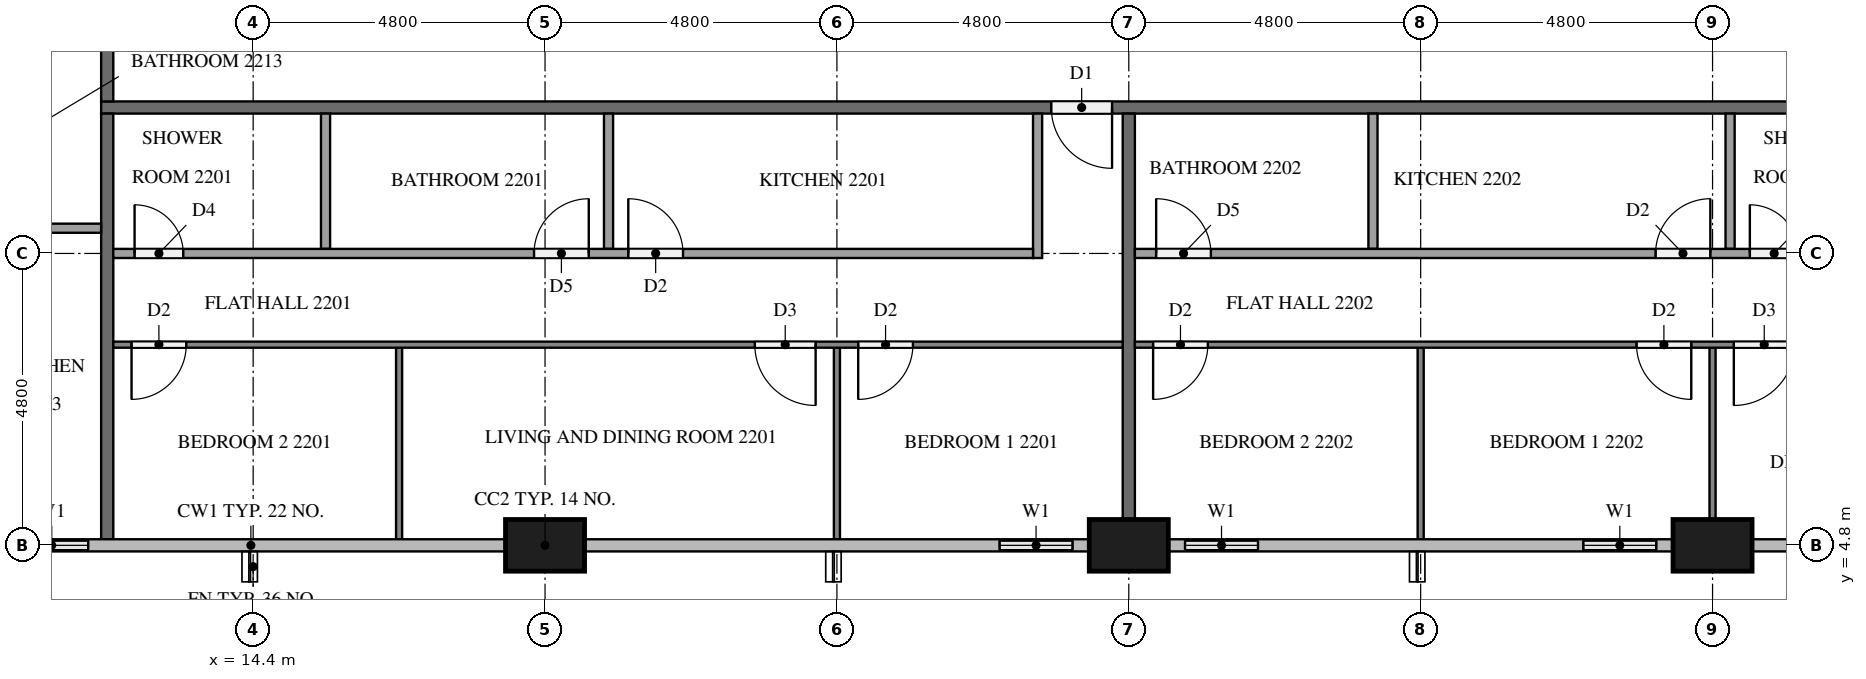
"""IFC4 building model, lengths in metres.
Left out: names, types, materials, properties, quantities, classifications, styles, units other than length and angle.
Written with IfcOpenShell. Run it as: python <this file> out.ifc"""

import sys

from ifc_helpers import new_model, si_unit, direction, frame, frame_2d, origin, origin_2d, place, context, subcontext, project, spatial, rectangle, extrude, element, fill, save


model = new_model("IFC4")
c1 = context("Model", 3, precision=1e-05, world=origin(), true_north=direction((0.0, 1.0)))
c2 = subcontext(c1, "Body", "Model", "MODEL_VIEW")
j1 = project(units=[si_unit("LENGTHUNIT", "METRE"), si_unit("PLANEANGLEUNIT", "RADIAN")], contexts=[c1])
p1 = place(None, origin())
s1 = spatial("IfcSite", under=j1, at=p1, CompositionType="ELEMENT")
p2 = place(p1, origin())
s2 = spatial("IfcBuilding", under=s1, at=p2, CompositionType="ELEMENT")
p3 = place(p2, frame((0.0, 0.0, 89.2)))
s3 = spatial("IfcBuildingStorey", under=s2, at=p3, CompositionType="ELEMENT", Elevation=89.2)
for number, where, z_axis, x_axis in (
    (1, (19.2, 4.8, 0.0), (0.0, 0.0, 1.0), (1.0, 0.0, 0.0)),
    (2, (28.8, 4.8, 0.0), (0.0, 0.0, 1.0), (1.0, 0.0, 0.0)),
    (3, (38.4, 4.8, 0.0), (0.0, 0.0, 1.0), (1.0, 0.0, 0.0)),
):
    element("IfcColumn", number, at=place(p3, frame(where, z_axis=z_axis, x_axis=x_axis)), inside=s3, PredefinedType="COLUMN", context=c2, shape_type="SweptSolid", body=[
        extrude(rectangle(XDim=1.3, YDim=0.85, at=origin_2d()), origin(), (0.0, 0.0, 1.0), 3.2),
    ])
p4 = place(p3, frame((10.175, 4.8, 0.0), z_axis=(0.0, 0.0, 1.0), x_axis=(1.0, 0.0, 0.0)))
e4 = element("IfcWall", 4, at=p4, inside=s3, PredefinedType="SOLIDWALL", context=c2, shape_type="SweptSolid", body=[
    extrude(rectangle(XDim=1.825, YDim=0.15, at=frame_2d((0.913, 0.0))), origin(), (0.0, 0.0, 1.0), 3.2),
])
p5 = place(p4, frame((0.312, 0.0, 0.9)))
e5 = element("IfcOpeningElement", 5, at=p5, cuts=e4, PredefinedType="OPENING", context=c2, shape_type="SweptSolid", body=[
    extrude(rectangle(XDim=1.2, YDim=1.4, at=frame_2d((0.6, 0.7))), frame((0.0, 0.085, 0.0), z_axis=(0.0, -1.0, 0.0), x_axis=(1.0, 0.0, 0.0)), (0.0, 0.0, 1.0), 0.17),
])
p6 = place(p3, frame((26.4, 4.8, 0.0), z_axis=(0.0, 0.0, 1.0), x_axis=(1.0, 0.0, 0.0)))
e6 = element("IfcWall", 6, at=p6, inside=s3, PredefinedType="SOLIDWALL", context=c2, shape_type="SweptSolid", body=[
    extrude(rectangle(XDim=1.75, YDim=0.15, at=frame_2d((0.875, 0.0))), origin(), (0.0, 0.0, 1.0), 3.2),
])
p7 = place(p6, frame((0.275, 0.0, 0.9)))
e7 = element("IfcOpeningElement", 7, at=p7, cuts=e6, PredefinedType="OPENING", context=c2, shape_type="SweptSolid", body=[
    extrude(rectangle(XDim=1.2, YDim=1.4, at=frame_2d((0.6, 0.7))), frame((0.0, 0.085, 0.0), z_axis=(0.0, -1.0, 0.0), x_axis=(1.0, 0.0, 0.0)), (0.0, 0.0, 1.0), 0.17),
])
p8 = place(p3, frame((29.45, 4.8, 0.0), z_axis=(0.0, 0.0, 1.0), x_axis=(1.0, 0.0, 0.0)))
e8 = element("IfcWall", 8, at=p8, inside=s3, PredefinedType="SOLIDWALL", context=c2, shape_type="SweptSolid", body=[
    extrude(rectangle(XDim=1.75, YDim=0.15, at=frame_2d((0.875, 0.0))), origin(), (0.0, 0.0, 1.0), 3.2),
])
p9 = place(p8, frame((0.275, 0.0, 0.9)))
e9 = element("IfcOpeningElement", 9, at=p9, cuts=e8, PredefinedType="OPENING", context=c2, shape_type="SweptSolid", body=[
    extrude(rectangle(XDim=1.2, YDim=1.4, at=frame_2d((0.6, 0.7))), frame((0.0, 0.085, 0.0), z_axis=(0.0, -1.0, 0.0), x_axis=(1.0, 0.0, 0.0)), (0.0, 0.0, 1.0), 0.17),
])
p10 = place(p3, frame((36.0, 4.8, 0.0), z_axis=(0.0, 0.0, 1.0), x_axis=(1.0, 0.0, 0.0)))
e10 = element("IfcWall", 10, at=p10, inside=s3, PredefinedType="SOLIDWALL", context=c2, shape_type="SweptSolid", body=[
    extrude(rectangle(XDim=1.75, YDim=0.15, at=frame_2d((0.875, 0.0))), origin(), (0.0, 0.0, 1.0), 3.2),
])
p11 = place(p10, frame((0.275, 0.0, 0.9)))
e11 = element("IfcOpeningElement", 11, at=p11, cuts=e10, PredefinedType="OPENING", context=c2, shape_type="SweptSolid", body=[
    extrude(rectangle(XDim=1.2, YDim=1.4, at=frame_2d((0.6, 0.7))), frame((0.0, 0.085, 0.0), z_axis=(0.0, -1.0, 0.0), x_axis=(1.0, 0.0, 0.0)), (0.0, 0.0, 1.0), 0.17),
])
p12 = place(p3, frame((50.5, 12.0, 0.0), z_axis=(0.0, 0.0, 1.0), x_axis=(-1.0, 0.0, 0.0)))
e12 = element("IfcWall", 12, at=p12, inside=s3, PredefinedType="PARTITIONING", context=c2, shape_type="SweptSolid", body=[
    extrude(rectangle(XDim=38.6, YDim=0.2, at=frame_2d((19.3, 0.0))), origin(), (0.0, 0.0, 1.0), 3.2),
])
p13 = place(p12, frame((21.975, 0.0, 0.0)))
e13 = element("IfcOpeningElement", 13, at=p13, cuts=e12, PredefinedType="OPENING", context=c2, shape_type="SweptSolid", body=[
    extrude(rectangle(XDim=1.0, YDim=2.1, at=frame_2d((0.5, 1.05))), frame((0.0, 0.11, 0.0), z_axis=(0.0, -1.0, 0.0), x_axis=(1.0, 0.0, 0.0)), (0.0, 0.0, 1.0), 0.22),
])
p14 = place(p12, frame((7.575, 0.0, 0.0)))
e14 = element("IfcOpeningElement", 14, at=p14, cuts=e12, PredefinedType="OPENING", context=c2, shape_type="SweptSolid", body=[
    extrude(rectangle(XDim=1.0, YDim=2.1, at=frame_2d((0.5, 1.05))), frame((0.0, 0.11, 0.0), z_axis=(0.0, -1.0, 0.0), x_axis=(1.0, 0.0, 0.0)), (0.0, 0.0, 1.0), 0.22),
])
p15 = place(p12, frame((0.375, 0.0, 0.0)))
e15 = element("IfcOpeningElement", 15, at=p15, cuts=e12, PredefinedType="OPENING", context=c2, shape_type="SweptSolid", body=[
    extrude(rectangle(XDim=1.0, YDim=2.1, at=frame_2d((0.5, 1.05))), frame((0.0, 0.11, 0.0), z_axis=(0.0, -1.0, 0.0), x_axis=(1.0, 0.0, 0.0)), (0.0, 0.0, 1.0), 0.22),
])
p16 = place(p3, frame((12.0, 12.1, 0.0), z_axis=(0.0, 0.0, 1.0), x_axis=(0.0, 1.0, 0.0)))
e16 = element("IfcWall", 16, at=p16, inside=s3, PredefinedType="PARTITIONING", context=c2, shape_type="SweptSolid", body=[
    extrude(rectangle(XDim=2.8, YDim=0.2, at=frame_2d((1.4, 0.0))), origin(), (0.0, 0.0, 1.0), 3.2),
])
p17 = place(p16, frame((1.625, 0.0, 0.0)))
e17 = element("IfcOpeningElement", 17, at=p17, cuts=e16, PredefinedType="OPENING", context=c2, shape_type="SweptSolid", body=[
    extrude(rectangle(XDim=1.0, YDim=2.1, at=frame_2d((0.5, 1.05))), frame((0.0, 0.11, 0.0), z_axis=(0.0, -1.0, 0.0), x_axis=(1.0, 0.0, 0.0)), (0.0, 0.0, 1.0), 0.22),
])
p18 = place(p3, frame((28.8, 11.9, 0.0), z_axis=(0.0, 0.0, 1.0), x_axis=(0.0, -1.0, 0.0)))
e18 = element("IfcWall", 18, at=p18, inside=s3, PredefinedType="PARTITIONING", context=c2, shape_type="SweptSolid", body=[
    extrude(rectangle(XDim=6.675, YDim=0.2, at=frame_2d((3.337, 0.0))), origin(), (0.0, 0.0, 1.0), 3.2),
])
p19 = place(p3, frame((12.0, 4.9, 0.0), z_axis=(0.0, 0.0, 1.0), x_axis=(0.0, 1.0, 0.0)))
e19 = element("IfcWall", 19, at=p19, inside=s3, PredefinedType="PARTITIONING", context=c2, shape_type="SweptSolid", body=[
    extrude(rectangle(XDim=7.0, YDim=0.2, at=frame_2d((3.5, 0.0))), origin(), (0.0, 0.0, 1.0), 3.2),
])
for number, where, z_axis, x_axis in (
    (20, (24.0, 8.05, 0.0), (0.0, 0.0, 1.0), (0.0, -1.0, 0.0)),
    (21, (16.8, 8.05, 0.0), (0.0, 0.0, 1.0), (0.0, -1.0, 0.0)),
):
    element("IfcWall", number, at=place(p3, frame(where, z_axis=z_axis, x_axis=x_axis)), inside=s3, PredefinedType="PARTITIONING", context=c2, shape_type="SweptSolid", body=[
        extrude(rectangle(XDim=3.15, YDim=0.1, at=frame_2d((1.575, 0.0))), origin(), (0.0, 0.0, 1.0), 3.2),
    ])
p20 = place(p3, frame((28.7, 8.1, 0.0), z_axis=(0.0, 0.0, 1.0), x_axis=(-1.0, 0.0, 0.0)))
e22 = element("IfcWall", 22, at=p20, inside=s3, PredefinedType="PARTITIONING", context=c2, shape_type="SweptSolid", body=[
    extrude(rectangle(XDim=16.6, YDim=0.1, at=frame_2d((8.3, 0.0))), origin(), (0.0, 0.0, 1.0), 3.2),
])
p21 = place(p20, frame((3.45, 0.0, 0.0)))
e23 = element("IfcOpeningElement", 23, at=p21, cuts=e22, PredefinedType="OPENING", context=c2, shape_type="SweptSolid", body=[
    extrude(rectangle(XDim=0.9, YDim=2.1, at=frame_2d((0.45, 1.05))), frame((0.0, 0.06, 0.0), z_axis=(0.0, -1.0, 0.0), x_axis=(1.0, 0.0, 0.0)), (0.0, 0.0, 1.0), 0.12),
])
p22 = place(p20, frame((5.05, 0.0, 0.0)))
e24 = element("IfcOpeningElement", 24, at=p22, cuts=e22, PredefinedType="OPENING", context=c2, shape_type="SweptSolid", body=[
    extrude(rectangle(XDim=1.0, YDim=2.1, at=frame_2d((0.5, 1.05))), frame((0.0, 0.06, 0.0), z_axis=(0.0, -1.0, 0.0), x_axis=(1.0, 0.0, 0.0)), (0.0, 0.0, 1.0), 0.12),
])
p23 = place(p20, frame((15.4, 0.0, 0.0)))
e25 = element("IfcOpeningElement", 25, at=p23, cuts=e22, PredefinedType="OPENING", context=c2, shape_type="SweptSolid", body=[
    extrude(rectangle(XDim=0.9, YDim=2.1, at=frame_2d((0.45, 1.05))), frame((0.0, 0.06, 0.0), z_axis=(0.0, -1.0, 0.0), x_axis=(1.0, 0.0, 0.0)), (0.0, 0.0, 1.0), 0.12),
])
for number, where, z_axis, x_axis in (
    (26, (20.244, 11.9, 0.0), (0.0, 0.0, 1.0), (0.0, -1.0, 0.0)),
    (27, (15.59, 11.9, 0.0), (0.0, 0.0, 1.0), (0.0, -1.0, 0.0)),
):
    element("IfcWall", number, at=place(p3, frame(where, z_axis=z_axis, x_axis=x_axis)), inside=s3, PredefinedType="PARTITIONING", context=c2, shape_type="SweptSolid", body=[
        extrude(rectangle(XDim=2.225, YDim=0.15, at=frame_2d((1.112, 0.0))), origin(), (0.0, 0.0, 1.0), 3.2),
    ])
p24 = place(p3, frame((27.3, 11.9, 0.0), z_axis=(0.0, 0.0, 1.0), x_axis=(0.0, -1.0, 0.0)))
e28 = element("IfcWall", 28, at=p24, inside=s3, PredefinedType="PARTITIONING", context=c2, shape_type="SweptSolid", body=[
    extrude(rectangle(XDim=2.375, YDim=0.15, at=frame_2d((1.188, 0.0))), origin(), (0.0, 0.0, 1.0), 3.2),
])
p25 = place(p3, frame((12.1, 9.6, 0.0), z_axis=(0.0, 0.0, 1.0), x_axis=(1.0, 0.0, 0.0)))
e29 = element("IfcWall", 29, at=p25, inside=s3, PredefinedType="PARTITIONING", context=c2, shape_type="SweptSolid", body=[
    extrude(rectangle(XDim=15.125, YDim=0.15, at=frame_2d((7.562, 0.0))), origin(), (0.0, 0.0, 1.0), 3.2),
])
p26 = place(p25, frame((8.469, 0.0, 0.0)))
e30 = element("IfcOpeningElement", 30, at=p26, cuts=e29, PredefinedType="OPENING", context=c2, shape_type="SweptSolid", body=[
    extrude(rectangle(XDim=0.9, YDim=2.1, at=frame_2d((0.45, 1.05))), frame((0.0, 0.085, 0.0), z_axis=(0.0, -1.0, 0.0), x_axis=(1.0, 0.0, 0.0)), (0.0, 0.0, 1.0), 0.17),
])
p27 = place(p25, frame((6.919, 0.0, 0.0)))
e31 = element("IfcOpeningElement", 31, at=p27, cuts=e29, PredefinedType="OPENING", context=c2, shape_type="SweptSolid", body=[
    extrude(rectangle(XDim=0.9, YDim=2.1, at=frame_2d((0.45, 1.05))), frame((0.0, 0.085, 0.0), z_axis=(0.0, -1.0, 0.0), x_axis=(1.0, 0.0, 0.0)), (0.0, 0.0, 1.0), 0.17),
])
p28 = place(p25, frame((0.35, 0.0, 0.0)))
e32 = element("IfcOpeningElement", 32, at=p28, cuts=e29, PredefinedType="OPENING", context=c2, shape_type="SweptSolid", body=[
    extrude(rectangle(XDim=0.8, YDim=2.1, at=frame_2d((0.4, 1.05))), frame((0.0, 0.085, 0.0), z_axis=(0.0, -1.0, 0.0), x_axis=(1.0, 0.0, 0.0)), (0.0, 0.0, 1.0), 0.17),
])
p29 = place(p3, frame((38.4, 8.05, 0.0), z_axis=(0.0, 0.0, 1.0), x_axis=(0.0, -1.0, 0.0)))
e33 = element("IfcWall", 33, at=p29, inside=s3, PredefinedType="PARTITIONING", context=c2, shape_type="SweptSolid", body=[
    extrude(rectangle(XDim=2.825, YDim=0.1, at=frame_2d((1.413, 0.0))), origin(), (0.0, 0.0, 1.0), 3.2),
])
p30 = place(p3, frame((33.6, 8.05, 0.0), z_axis=(0.0, 0.0, 1.0), x_axis=(0.0, -1.0, 0.0)))
e34 = element("IfcWall", 34, at=p30, inside=s3, PredefinedType="PARTITIONING", context=c2, shape_type="SweptSolid", body=[
    extrude(rectangle(XDim=3.15, YDim=0.1, at=frame_2d((1.575, 0.0))), origin(), (0.0, 0.0, 1.0), 3.2),
])
p31 = place(p3, frame((43.1, 8.1, 0.0), z_axis=(0.0, 0.0, 1.0), x_axis=(-1.0, 0.0, 0.0)))
e35 = element("IfcWall", 35, at=p31, inside=s3, PredefinedType="PARTITIONING", context=c2, shape_type="SweptSolid", body=[
    extrude(rectangle(XDim=14.2, YDim=0.1, at=frame_2d((7.1, 0.0))), origin(), (0.0, 0.0, 1.0), 3.2),
])
p32 = place(p31, frame((3.35, 0.0, 0.0)))
e36 = element("IfcOpeningElement", 36, at=p32, cuts=e35, PredefinedType="OPENING", context=c2, shape_type="SweptSolid", body=[
    extrude(rectangle(XDim=1.0, YDim=2.1, at=frame_2d((0.5, 1.05))), frame((0.0, 0.06, 0.0), z_axis=(0.0, -1.0, 0.0), x_axis=(1.0, 0.0, 0.0)), (0.0, 0.0, 1.0), 0.12),
])
p33 = place(p31, frame((5.05, 0.0, 0.0)))
e37 = element("IfcOpeningElement", 37, at=p33, cuts=e35, PredefinedType="OPENING", context=c2, shape_type="SweptSolid", body=[
    extrude(rectangle(XDim=0.9, YDim=2.1, at=frame_2d((0.45, 1.05))), frame((0.0, 0.06, 0.0), z_axis=(0.0, -1.0, 0.0), x_axis=(1.0, 0.0, 0.0)), (0.0, 0.0, 1.0), 0.12),
])
p34 = place(p31, frame((13.0, 0.0, 0.0)))
e38 = element("IfcOpeningElement", 38, at=p34, cuts=e35, PredefinedType="OPENING", context=c2, shape_type="SweptSolid", body=[
    extrude(rectangle(XDim=0.9, YDim=2.1, at=frame_2d((0.45, 1.05))), frame((0.0, 0.06, 0.0), z_axis=(0.0, -1.0, 0.0), x_axis=(1.0, 0.0, 0.0)), (0.0, 0.0, 1.0), 0.12),
])
for number, where, z_axis, x_axis in (
    (39, (38.688, 11.9, 0.0), (0.0, 0.0, 1.0), (0.0, -1.0, 0.0)),
    (40, (32.815, 11.9, 0.0), (0.0, 0.0, 1.0), (0.0, -1.0, 0.0)),
):
    element("IfcWall", number, at=place(p3, frame(where, z_axis=z_axis, x_axis=x_axis)), inside=s3, PredefinedType="PARTITIONING", context=c2, shape_type="SweptSolid", body=[
        extrude(rectangle(XDim=2.225, YDim=0.15, at=frame_2d((1.112, 0.0))), origin(), (0.0, 0.0, 1.0), 3.2),
    ])
p35 = place(p3, frame((28.9, 9.6, 0.0), z_axis=(0.0, 0.0, 1.0), x_axis=(1.0, 0.0, 0.0)))
e41 = element("IfcWall", 41, at=p35, inside=s3, PredefinedType="PARTITIONING", context=c2, shape_type="SweptSolid", body=[
    extrude(rectangle(XDim=12.725, YDim=0.15, at=frame_2d((6.363, 0.0))), origin(), (0.0, 0.0, 1.0), 3.2),
])
p36 = place(p35, frame((10.114, 0.0, 0.0)))
e42 = element("IfcOpeningElement", 42, at=p36, cuts=e41, PredefinedType="OPENING", context=c2, shape_type="SweptSolid", body=[
    extrude(rectangle(XDim=0.8, YDim=2.1, at=frame_2d((0.4, 1.05))), frame((0.0, 0.085, 0.0), z_axis=(0.0, -1.0, 0.0), x_axis=(1.0, 0.0, 0.0)), (0.0, 0.0, 1.0), 0.17),
])
p37 = place(p35, frame((8.563, 0.0, 0.0)))
e43 = element("IfcOpeningElement", 43, at=p37, cuts=e41, PredefinedType="OPENING", context=c2, shape_type="SweptSolid", body=[
    extrude(rectangle(XDim=0.9, YDim=2.1, at=frame_2d((0.45, 1.05))), frame((0.0, 0.085, 0.0), z_axis=(0.0, -1.0, 0.0), x_axis=(1.0, 0.0, 0.0)), (0.0, 0.0, 1.0), 0.17),
])
p38 = place(p35, frame((0.35, 0.0, 0.0)))
e44 = element("IfcOpeningElement", 44, at=p38, cuts=e41, PredefinedType="OPENING", context=c2, shape_type="SweptSolid", body=[
    extrude(rectangle(XDim=0.9, YDim=2.1, at=frame_2d((0.45, 1.05))), frame((0.0, 0.085, 0.0), z_axis=(0.0, -1.0, 0.0), x_axis=(1.0, 0.0, 0.0)), (0.0, 0.0, 1.0), 0.17),
])
p39 = place(p3, frame((11.9, 10.015, 0.0), z_axis=(0.0, 0.0, 1.0), x_axis=(-1.0, 0.0, 0.0)))
e45 = element("IfcWall", 45, at=p39, inside=s3, PredefinedType="PARTITIONING", context=c2, shape_type="SweptSolid", body=[
    extrude(rectangle(XDim=1.925, YDim=0.15, at=frame_2d((0.962, 0.0))), origin(), (0.0, 0.0, 1.0), 3.2),
])
p40 = place(p5, origin())
e46 = element("IfcWindow", 46, at=p40, inside=s3, PartitioningType="SINGLE_PANEL", PredefinedType="WINDOW", context=c2, shape_type="SweptSolid", body=[
    extrude(rectangle(XDim=1.2, YDim=1.4, at=frame_2d((0.6, 0.7))), frame((0.0, 0.03, 0.0), z_axis=(0.0, -1.0, 0.0), x_axis=(1.0, 0.0, 0.0)), (0.0, 0.0, 1.0), 0.06),
])
fill(e5, e46)
p41 = place(p7, origin())
e47 = element("IfcWindow", 47, at=p41, inside=s3, PartitioningType="SINGLE_PANEL", PredefinedType="WINDOW", context=c2, shape_type="SweptSolid", body=[
    extrude(rectangle(XDim=1.2, YDim=1.4, at=frame_2d((0.6, 0.7))), frame((0.0, 0.03, 0.0), z_axis=(0.0, -1.0, 0.0), x_axis=(1.0, 0.0, 0.0)), (0.0, 0.0, 1.0), 0.06),
])
fill(e7, e47)
p42 = place(p9, origin())
e48 = element("IfcWindow", 48, at=p42, inside=s3, PartitioningType="SINGLE_PANEL", PredefinedType="WINDOW", context=c2, shape_type="SweptSolid", body=[
    extrude(rectangle(XDim=1.2, YDim=1.4, at=frame_2d((0.6, 0.7))), frame((0.0, 0.03, 0.0), z_axis=(0.0, -1.0, 0.0), x_axis=(1.0, 0.0, 0.0)), (0.0, 0.0, 1.0), 0.06),
])
fill(e9, e48)
p43 = place(p11, origin())
e49 = element("IfcWindow", 49, at=p43, inside=s3, PartitioningType="SINGLE_PANEL", PredefinedType="WINDOW", context=c2, shape_type="SweptSolid", body=[
    extrude(rectangle(XDim=1.2, YDim=1.4, at=frame_2d((0.6, 0.7))), frame((0.0, 0.03, 0.0), z_axis=(0.0, -1.0, 0.0), x_axis=(1.0, 0.0, 0.0)), (0.0, 0.0, 1.0), 0.06),
])
fill(e11, e49)
p44 = place(p13, origin())
e50 = element("IfcDoor", 50, at=p44, inside=s3, OperationType="SINGLE_SWING_LEFT", PredefinedType="DOOR", context=c2, shape_type="SweptSolid", body=[
    extrude(rectangle(XDim=1.0, YDim=2.1, at=frame_2d((0.5, 1.05))), frame((0.0, 0.025, 0.0), z_axis=(0.0, -1.0, 0.0), x_axis=(1.0, 0.0, 0.0)), (0.0, 0.0, 1.0), 0.05),
])
fill(e13, e50)
p45 = place(p21, origin())
e51 = element("IfcDoor", 51, at=p45, inside=s3, OperationType="SINGLE_SWING_RIGHT", PredefinedType="DOOR", context=c2, shape_type="SweptSolid", body=[
    extrude(rectangle(XDim=0.9, YDim=2.1, at=frame_2d((0.45, 1.05))), frame((0.0, 0.025, 0.0), z_axis=(0.0, -1.0, 0.0), x_axis=(1.0, 0.0, 0.0)), (0.0, 0.0, 1.0), 0.05),
])
fill(e23, e51)
p46 = place(p22, origin())
e52 = element("IfcDoor", 52, at=p46, inside=s3, OperationType="SINGLE_SWING_LEFT", PredefinedType="DOOR", context=c2, shape_type="SweptSolid", body=[
    extrude(rectangle(XDim=1.0, YDim=2.1, at=frame_2d((0.5, 1.05))), frame((0.0, 0.025, 0.0), z_axis=(0.0, -1.0, 0.0), x_axis=(1.0, 0.0, 0.0)), (0.0, 0.0, 1.0), 0.05),
])
fill(e24, e52)
p47 = place(p23, origin())
e53 = element("IfcDoor", 53, at=p47, inside=s3, OperationType="SINGLE_SWING_RIGHT", PredefinedType="DOOR", context=c2, shape_type="SweptSolid", body=[
    extrude(rectangle(XDim=0.9, YDim=2.1, at=frame_2d((0.45, 1.05))), frame((0.0, 0.025, 0.0), z_axis=(0.0, -1.0, 0.0), x_axis=(1.0, 0.0, 0.0)), (0.0, 0.0, 1.0), 0.05),
])
fill(e25, e53)
p48 = place(p26, origin())
e54 = element("IfcDoor", 54, at=p48, inside=s3, OperationType="SINGLE_SWING_LEFT", PredefinedType="DOOR", context=c2, shape_type="SweptSolid", body=[
    extrude(rectangle(XDim=0.9, YDim=2.1, at=frame_2d((0.45, 1.05))), frame((0.0, 0.025, 0.0), z_axis=(0.0, -1.0, 0.0), x_axis=(1.0, 0.0, 0.0)), (0.0, 0.0, 1.0), 0.05),
])
fill(e30, e54)
p49 = place(p27, origin())
e55 = element("IfcDoor", 55, at=p49, inside=s3, OperationType="SINGLE_SWING_RIGHT", PredefinedType="DOOR", context=c2, shape_type="SweptSolid", body=[
    extrude(rectangle(XDim=0.9, YDim=2.1, at=frame_2d((0.45, 1.05))), frame((0.0, 0.025, 0.0), z_axis=(0.0, -1.0, 0.0), x_axis=(1.0, 0.0, 0.0)), (0.0, 0.0, 1.0), 0.05),
])
fill(e31, e55)
p50 = place(p28, origin())
e56 = element("IfcDoor", 56, at=p50, inside=s3, OperationType="SINGLE_SWING_LEFT", PredefinedType="DOOR", context=c2, shape_type="SweptSolid", body=[
    extrude(rectangle(XDim=0.8, YDim=2.1, at=frame_2d((0.4, 1.05))), frame((0.0, 0.025, 0.0), z_axis=(0.0, -1.0, 0.0), x_axis=(1.0, 0.0, 0.0)), (0.0, 0.0, 1.0), 0.05),
])
fill(e32, e56)
p51 = place(p32, origin())
e57 = element("IfcDoor", 57, at=p51, inside=s3, OperationType="SINGLE_SWING_RIGHT", PredefinedType="DOOR", context=c2, shape_type="SweptSolid", body=[
    extrude(rectangle(XDim=1.0, YDim=2.1, at=frame_2d((0.5, 1.05))), frame((0.0, 0.025, 0.0), z_axis=(0.0, -1.0, 0.0), x_axis=(1.0, 0.0, 0.0)), (0.0, 0.0, 1.0), 0.05),
])
fill(e36, e57)
p52 = place(p33, origin())
e58 = element("IfcDoor", 58, at=p52, inside=s3, OperationType="SINGLE_SWING_LEFT", PredefinedType="DOOR", context=c2, shape_type="SweptSolid", body=[
    extrude(rectangle(XDim=0.9, YDim=2.1, at=frame_2d((0.45, 1.05))), frame((0.0, 0.025, 0.0), z_axis=(0.0, -1.0, 0.0), x_axis=(1.0, 0.0, 0.0)), (0.0, 0.0, 1.0), 0.05),
])
fill(e37, e58)
p53 = place(p34, origin())
e59 = element("IfcDoor", 59, at=p53, inside=s3, OperationType="SINGLE_SWING_RIGHT", PredefinedType="DOOR", context=c2, shape_type="SweptSolid", body=[
    extrude(rectangle(XDim=0.9, YDim=2.1, at=frame_2d((0.45, 1.05))), frame((0.0, 0.025, 0.0), z_axis=(0.0, -1.0, 0.0), x_axis=(1.0, 0.0, 0.0)), (0.0, 0.0, 1.0), 0.05),
])
fill(e38, e59)
p54 = place(p36, origin())
e60 = element("IfcDoor", 60, at=p54, inside=s3, OperationType="SINGLE_SWING_LEFT", PredefinedType="DOOR", context=c2, shape_type="SweptSolid", body=[
    extrude(rectangle(XDim=0.8, YDim=2.1, at=frame_2d((0.4, 1.05))), frame((0.0, 0.025, 0.0), z_axis=(0.0, -1.0, 0.0), x_axis=(1.0, 0.0, 0.0)), (0.0, 0.0, 1.0), 0.05),
])
fill(e42, e60)
p55 = place(p37, origin())
e61 = element("IfcDoor", 61, at=p55, inside=s3, OperationType="SINGLE_SWING_RIGHT", PredefinedType="DOOR", context=c2, shape_type="SweptSolid", body=[
    extrude(rectangle(XDim=0.9, YDim=2.1, at=frame_2d((0.45, 1.05))), frame((0.0, 0.025, 0.0), z_axis=(0.0, -1.0, 0.0), x_axis=(1.0, 0.0, 0.0)), (0.0, 0.0, 1.0), 0.05),
])
fill(e43, e61)
p56 = place(p38, origin())
e62 = element("IfcDoor", 62, at=p56, inside=s3, OperationType="SINGLE_SWING_LEFT", PredefinedType="DOOR", context=c2, shape_type="SweptSolid", body=[
    extrude(rectangle(XDim=0.9, YDim=2.1, at=frame_2d((0.45, 1.05))), frame((0.0, 0.025, 0.0), z_axis=(0.0, -1.0, 0.0), x_axis=(1.0, 0.0, 0.0)), (0.0, 0.0, 1.0), 0.05),
])
fill(e44, e62)
save(model, sys.argv[1])
